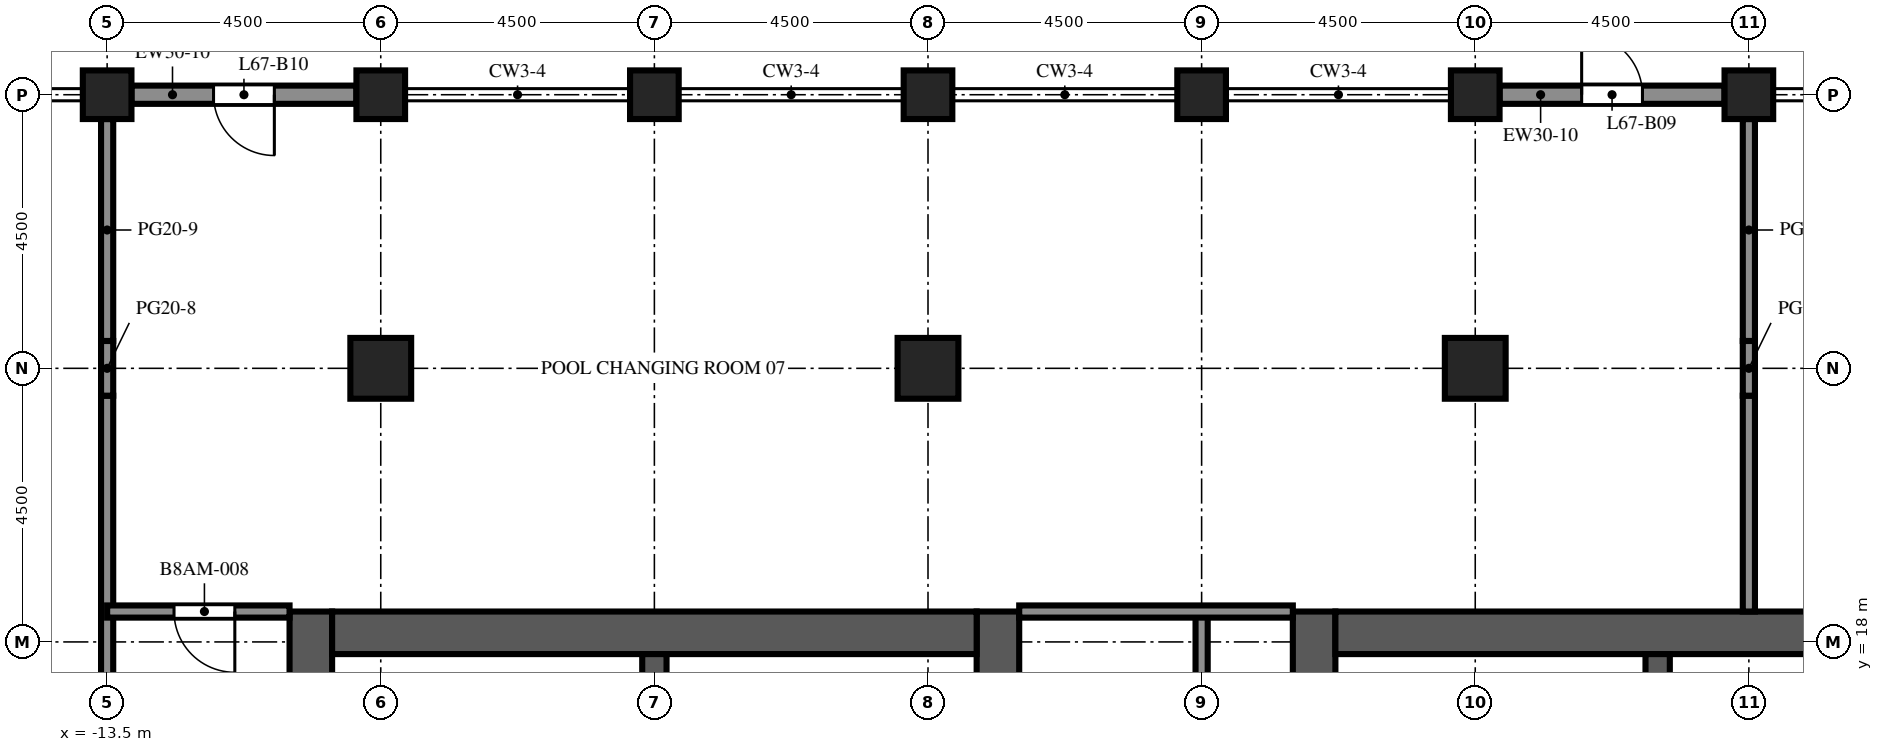
"""IFC4 building model, lengths in metres.
Left out: names, types, materials, properties, quantities, classifications, styles, units other than length and angle.
Written with IfcOpenShell. Run it as: python <this file> out.ifc"""

import sys

from ifc_helpers import new_model, si_unit, direction, frame, frame_2d, origin, origin_2d, place, context, subcontext, project, spatial, rectangle, extrude, element, fill, save


model = new_model("IFC4")
c1 = context("Model", 3, precision=1e-05, world=origin(), true_north=direction((0.0, 1.0)))
c2 = subcontext(c1, "Body", "Model", "MODEL_VIEW")
j1 = project(units=[si_unit("LENGTHUNIT", "METRE"), si_unit("PLANEANGLEUNIT", "RADIAN")], contexts=[c1])
p1 = place(None, origin())
s1 = spatial("IfcSite", under=j1, at=p1, CompositionType="ELEMENT")
p2 = place(p1, origin())
s2 = spatial("IfcBuilding", under=s1, at=p2, CompositionType="ELEMENT")
p3 = place(p2, frame((0.0, 0.0, 295.0)))
s3 = spatial("IfcBuildingStorey", under=s2, at=p3, CompositionType="ELEMENT", Elevation=295.0)
for number, where, z_axis, x_axis in (
    (1, (-13.5, 27.0, 0.0), (0.0, 0.0, 1.0), (1.0, 0.0, 0.0)),
    (2, (-9.0, 27.0, 0.0), (0.0, 0.0, 1.0), (1.0, 0.0, 0.0)),
    (3, (-4.5, 27.0, 0.0), (0.0, 0.0, 1.0), (1.0, 0.0, 0.0)),
    (4, (0.0, 27.0, 0.0), (0.0, 0.0, 1.0), (1.0, 0.0, 0.0)),
    (5, (4.5, 27.0, 0.0), (0.0, 0.0, 1.0), (1.0, 0.0, 0.0)),
    (6, (9.0, 27.0, 0.0), (0.0, 0.0, 1.0), (1.0, 0.0, 0.0)),
    (7, (13.5, 27.0, 0.0), (0.0, 0.0, 1.0), (1.0, 0.0, 0.0)),
):
    element("IfcColumn", number, at=place(p3, frame(where, z_axis=z_axis, x_axis=x_axis)), inside=s3, PredefinedType="COLUMN", context=c2, shape_type="SweptSolid", body=[
        extrude(rectangle(XDim=0.8, YDim=0.8, at=origin_2d()), origin(), (0.0, 0.0, 1.0), 6.0),
    ])
for number, where, z_axis, x_axis in (
    (8, (-9.0, 22.5, 0.0), (0.0, 0.0, 1.0), (1.0, 0.0, 0.0)),
    (9, (0.0, 22.5, 0.0), (0.0, 0.0, 1.0), (1.0, 0.0, 0.0)),
    (10, (9.0, 22.5, 0.0), (0.0, 0.0, 1.0), (1.0, 0.0, 0.0)),
):
    element("IfcColumn", number, at=place(p3, frame(where, z_axis=z_axis, x_axis=x_axis)), inside=s3, PredefinedType="COLUMN", context=c2, shape_type="SweptSolid", body=[
        extrude(rectangle(XDim=1.0, YDim=1.0, at=origin_2d()), origin(), (0.0, 0.0, 1.0), 5.4),
    ])
p4 = place(p3, frame((-10.15, -9.0, 0.0), z_axis=(0.0, 0.0, 1.0), x_axis=(0.0, 1.0, 0.0)))
e11 = element("IfcWall", 11, at=p4, inside=s3, PredefinedType="SHEAR", context=c2, shape_type="SweptSolid", body=[
    extrude(rectangle(XDim=27.5, YDim=0.7, at=frame_2d((13.75, 0.0))), origin(), (0.0, 0.0, 1.0), 6.0),
])
p5 = place(p4, frame((12.55, 0.0, 0.0)))
e12 = element("IfcOpeningElement", 12, at=p5, cuts=e11, PredefinedType="OPENING", context=c2, shape_type="SweptSolid", body=[
    extrude(rectangle(XDim=2.4, YDim=2.4, at=frame_2d((1.2, 1.2))), frame((0.0, 0.36, 0.0), z_axis=(0.0, -1.0, 0.0), x_axis=(1.0, 0.0, 0.0)), (0.0, 0.0, 1.0), 0.72),
])
p6 = place(p4, frame((6.825, 0.0, 0.0)))
e13 = element("IfcOpeningElement", 13, at=p6, cuts=e11, PredefinedType="OPENING", context=c2, shape_type="SweptSolid", body=[
    extrude(rectangle(XDim=1.2, YDim=2.1, at=frame_2d((0.6, 1.05))), frame((0.0, 0.36, 0.0), z_axis=(0.0, -1.0, 0.0), x_axis=(1.0, 0.0, 0.0)), (0.0, 0.0, 1.0), 0.72),
])
p7 = place(p4, frame((19.475, 0.0, 0.0)))
e14 = element("IfcOpeningElement", 14, at=p7, cuts=e11, PredefinedType="OPENING", context=c2, shape_type="SweptSolid", body=[
    extrude(rectangle(XDim=1.2, YDim=2.1, at=frame_2d((0.6, 1.05))), frame((0.0, 0.36, 0.0), z_axis=(0.0, -1.0, 0.0), x_axis=(1.0, 0.0, 0.0)), (0.0, 0.0, 1.0), 0.72),
])
p8 = place(p3, frame((1.15, -9.0, 0.0), z_axis=(0.0, 0.0, 1.0), x_axis=(0.0, 1.0, 0.0)))
e15 = element("IfcWall", 15, at=p8, inside=s3, PredefinedType="SHEAR", context=c2, shape_type="SweptSolid", body=[
    extrude(rectangle(XDim=27.5, YDim=0.7, at=frame_2d((13.75, 0.0))), origin(), (0.0, 0.0, 1.0), 6.0),
])
p9 = place(p8, frame((12.55, 0.0, 0.0)))
e16 = element("IfcOpeningElement", 16, at=p9, cuts=e15, PredefinedType="OPENING", context=c2, shape_type="SweptSolid", body=[
    extrude(rectangle(XDim=2.4, YDim=2.4, at=frame_2d((1.2, 1.2))), frame((0.0, 0.36, 0.0), z_axis=(0.0, -1.0, 0.0), x_axis=(1.0, 0.0, 0.0)), (0.0, 0.0, 1.0), 0.72),
])
p10 = place(p8, frame((5.46, 0.0, 0.0)))
e17 = element("IfcOpeningElement", 17, at=p10, cuts=e15, PredefinedType="OPENING", context=c2, shape_type="SweptSolid", body=[
    extrude(rectangle(XDim=0.968, YDim=2.1, at=frame_2d((0.484, 1.05))), frame((0.0, 0.36, 0.0), z_axis=(0.0, -1.0, 0.0), x_axis=(1.0, 0.0, 0.0)), (0.0, 0.0, 1.0), 0.72),
])
p11 = place(p8, frame((23.54, 0.0, 0.0)))
e18 = element("IfcOpeningElement", 18, at=p11, cuts=e15, PredefinedType="OPENING", context=c2, shape_type="SweptSolid", body=[
    extrude(rectangle(XDim=1.2, YDim=2.1, at=frame_2d((0.6, 1.05))), frame((0.0, 0.36, 0.0), z_axis=(0.0, -1.0, 0.0), x_axis=(1.0, 0.0, 0.0)), (0.0, 0.0, 1.0), 0.72),
])
p12 = place(p3, frame((-9.8, 18.15, 0.0), z_axis=(0.0, 0.0, 1.0), x_axis=(1.0, 0.0, 0.0)))
e19 = element("IfcWall", 19, at=p12, inside=s3, PredefinedType="SHEAR", context=c2, shape_type="SweptSolid", body=[
    extrude(rectangle(XDim=10.6, YDim=0.7, at=frame_2d((5.3, 0.0))), origin(), (0.0, 0.0, 1.0), 6.0),
])
p13 = place(p3, frame((-4.5, 10.2, 0.0), z_axis=(0.0, 0.0, 1.0), x_axis=(0.0, 1.0, 0.0)))
e20 = element("IfcWall", 20, at=p13, inside=s3, PredefinedType="SHEAR", context=c2, shape_type="SweptSolid", body=[
    extrude(rectangle(XDim=7.6, YDim=0.4, at=frame_2d((3.8, 0.0))), origin(), (0.0, 0.0, 1.0), 6.0),
])
p14 = place(p3, frame((6.35, -9.0, 0.0), z_axis=(0.0, 0.0, 1.0), x_axis=(0.0, 1.0, 0.0)))
e21 = element("IfcWall", 21, at=p14, inside=s3, PredefinedType="SHEAR", context=c2, shape_type="SweptSolid", body=[
    extrude(rectangle(XDim=27.5, YDim=0.7, at=frame_2d((13.75, 0.0))), origin(), (0.0, 0.0, 1.0), 6.0),
])
p15 = place(p14, frame((12.55, 0.0, 0.0)))
e22 = element("IfcOpeningElement", 22, at=p15, cuts=e21, PredefinedType="OPENING", context=c2, shape_type="SweptSolid", body=[
    extrude(rectangle(XDim=2.4, YDim=2.4, at=frame_2d((1.2, 1.2))), frame((0.0, 0.36, 0.0), z_axis=(0.0, -1.0, 0.0), x_axis=(1.0, 0.0, 0.0)), (0.0, 0.0, 1.0), 0.72),
])
p16 = place(p14, frame((5.46, 0.0, 0.0)))
e23 = element("IfcOpeningElement", 23, at=p16, cuts=e21, PredefinedType="OPENING", context=c2, shape_type="SweptSolid", body=[
    extrude(rectangle(XDim=0.968, YDim=2.1, at=frame_2d((0.484, 1.05))), frame((0.0, 0.36, 0.0), z_axis=(0.0, -1.0, 0.0), x_axis=(1.0, 0.0, 0.0)), (0.0, 0.0, 1.0), 0.72),
])
p17 = place(p14, frame((23.54, 0.0, 0.0)))
e24 = element("IfcOpeningElement", 24, at=p17, cuts=e21, PredefinedType="OPENING", context=c2, shape_type="SweptSolid", body=[
    extrude(rectangle(XDim=1.2, YDim=2.1, at=frame_2d((0.6, 1.05))), frame((0.0, 0.36, 0.0), z_axis=(0.0, -1.0, 0.0), x_axis=(1.0, 0.0, 0.0)), (0.0, 0.0, 1.0), 0.72),
])
p18 = place(p3, frame((6.7, 18.15, 0.0), z_axis=(0.0, 0.0, 1.0), x_axis=(1.0, 0.0, 0.0)))
e25 = element("IfcWall", 25, at=p18, inside=s3, PredefinedType="SHEAR", context=c2, shape_type="SweptSolid", body=[
    extrude(rectangle(XDim=10.6, YDim=0.7, at=frame_2d((5.3, 0.0))), origin(), (0.0, 0.0, 1.0), 6.0),
])
p19 = place(p3, frame((12.0, 10.2, 0.0), z_axis=(0.0, 0.0, 1.0), x_axis=(0.0, 1.0, 0.0)))
e26 = element("IfcWall", 26, at=p19, inside=s3, PredefinedType="SHEAR", context=c2, shape_type="SweptSolid", body=[
    extrude(rectangle(XDim=7.6, YDim=0.4, at=frame_2d((3.8, 0.0))), origin(), (0.0, 0.0, 1.0), 6.0),
])
p20 = place(p3, frame((9.4, 27.0, 0.0), z_axis=(0.0, 0.0, 1.0), x_axis=(1.0, 0.0, 0.0)))
e27 = element("IfcWall", 27, at=p20, inside=s3, PredefinedType="SOLIDWALL", context=c2, shape_type="SweptSolid", body=[
    extrude(rectangle(XDim=3.7, YDim=0.3, at=frame_2d((1.85, 0.0))), origin(), (0.0, 0.0, 1.0), 4.6),
])
p21 = place(p20, frame((1.35, 0.0, 0.0)))
e28 = element("IfcOpeningElement", 28, at=p21, cuts=e27, PredefinedType="OPENING", context=c2, shape_type="SweptSolid", body=[
    extrude(rectangle(XDim=1.0, YDim=2.2, at=frame_2d((0.5, 1.1))), frame((0.0, 0.16, 0.0), z_axis=(0.0, -1.0, 0.0), x_axis=(1.0, 0.0, 0.0)), (0.0, 0.0, 1.0), 0.32),
])
p22 = place(p3, frame((-13.1, 27.0, 0.0), z_axis=(0.0, 0.0, 1.0), x_axis=(1.0, 0.0, 0.0)))
e29 = element("IfcWall", 29, at=p22, inside=s3, PredefinedType="SOLIDWALL", context=c2, shape_type="SweptSolid", body=[
    extrude(rectangle(XDim=3.7, YDim=0.3, at=frame_2d((1.85, 0.0))), origin(), (0.0, 0.0, 1.0), 4.6),
])
p23 = place(p22, frame((1.35, 0.0, 0.0)))
e30 = element("IfcOpeningElement", 30, at=p23, cuts=e29, PredefinedType="OPENING", context=c2, shape_type="SweptSolid", body=[
    extrude(rectangle(XDim=1.0, YDim=2.2, at=frame_2d((0.5, 1.1))), frame((0.0, 0.16, 0.0), z_axis=(0.0, -1.0, 0.0), x_axis=(1.0, 0.0, 0.0)), (0.0, 0.0, 1.0), 0.32),
])
p24 = place(p3, frame((-0.5, 15.14, 0.0), z_axis=(0.0, 0.0, 1.0), x_axis=(0.0, 1.0, 0.0)))
e31 = element("IfcWall", 31, at=p24, inside=s3, PredefinedType="PARTITIONING", context=c2, shape_type="SweptSolid", body=[
    extrude(rectangle(XDim=2.66, YDim=0.1, at=frame_2d((1.33, 0.0))), origin(), (0.0, 0.0, 1.0), 5.4),
])
p25 = place(p24, frame((0.83, 0.0, 0.0)))
e32 = element("IfcOpeningElement", 32, at=p25, cuts=e31, PredefinedType="OPENING", context=c2, shape_type="SweptSolid", body=[
    extrude(rectangle(XDim=1.0, YDim=2.1, at=frame_2d((0.5, 1.05))), frame((0.0, 0.06, 0.0), z_axis=(0.0, -1.0, 0.0), x_axis=(1.0, 0.0, 0.0)), (0.0, 0.0, 1.0), 0.12),
])
p26 = place(p3, frame((8.0, 15.14, 0.0), z_axis=(0.0, 0.0, 1.0), x_axis=(0.0, 1.0, 0.0)))
e33 = element("IfcWall", 33, at=p26, inside=s3, PredefinedType="PARTITIONING", context=c2, shape_type="SweptSolid", body=[
    extrude(rectangle(XDim=2.66, YDim=0.1, at=frame_2d((1.33, 0.0))), origin(), (0.0, 0.0, 1.0), 5.4),
])
p27 = place(p26, frame((0.83, 0.0, 0.0)))
e34 = element("IfcOpeningElement", 34, at=p27, cuts=e33, PredefinedType="OPENING", context=c2, shape_type="SweptSolid", body=[
    extrude(rectangle(XDim=1.0, YDim=2.1, at=frame_2d((0.5, 1.05))), frame((0.0, 0.06, 0.0), z_axis=(0.0, -1.0, 0.0), x_axis=(1.0, 0.0, 0.0)), (0.0, 0.0, 1.0), 0.12),
])
p28 = place(p3, frame((-13.5, 6.25, 0.0), z_axis=(0.0, 0.0, 1.0), x_axis=(0.0, 1.0, 0.0)))
e35 = element("IfcWall", 35, at=p28, inside=s3, PredefinedType="PARTITIONING", context=c2, shape_type="SweptSolid", body=[
    extrude(rectangle(XDim=15.8, YDim=0.2, at=frame_2d((7.9, 0.0))), origin(), (0.0, 0.0, 1.0), 5.4),
])
p29 = place(p28, frame((7.1, 0.0, 0.0)))
e36 = element("IfcOpeningElement", 36, at=p29, cuts=e35, PredefinedType="OPENING", context=c2, shape_type="SweptSolid", body=[
    extrude(rectangle(XDim=1.0, YDim=2.1, at=frame_2d((0.5, 1.05))), frame((0.0, 0.11, 0.0), z_axis=(0.0, -1.0, 0.0), x_axis=(1.0, 0.0, 0.0)), (0.0, 0.0, 1.0), 0.22),
])
p30 = place(p3, frame((-13.5, 22.05, 0.0), z_axis=(0.0, 0.0, 1.0), x_axis=(0.0, 1.0, 0.0)))
e37 = element("IfcWall", 37, at=p30, inside=s3, PredefinedType="PARTITIONING", context=c2, shape_type="SweptSolid", body=[
    extrude(rectangle(XDim=0.9, YDim=0.2, at=frame_2d((0.45, 0.0))), origin(), (0.0, 0.0, 1.0), 3.57),
])
p31 = place(p3, frame((-13.5, 22.95, 0.0), z_axis=(0.0, 0.0, 1.0), x_axis=(0.0, 1.0, 0.0)))
e38 = element("IfcWall", 38, at=p31, inside=s3, PredefinedType="PARTITIONING", context=c2, shape_type="SweptSolid", body=[
    extrude(rectangle(XDim=3.65, YDim=0.2, at=frame_2d((1.825, 0.0))), origin(), (0.0, 0.0, 1.0), 4.77),
])
p32 = place(p3, frame((4.5, 18.5, 0.0), z_axis=(0.0, 0.0, 1.0), x_axis=(0.0, -1.0, 0.0)))
e39 = element("IfcWall", 39, at=p32, inside=s3, PredefinedType="PARTITIONING", context=c2, shape_type="SweptSolid", body=[
    extrude(rectangle(XDim=11.8, YDim=0.2, at=frame_2d((5.9, 0.0))), origin(), (0.0, 0.0, 1.0), 5.4),
])
p33 = place(p32, frame((4.7, 0.0, 0.0)))
e40 = element("IfcOpeningElement", 40, at=p33, cuts=e39, PredefinedType="OPENING", context=c2, shape_type="SweptSolid", body=[
    extrude(rectangle(XDim=1.0, YDim=2.1, at=frame_2d((0.5, 1.05))), frame((0.0, 0.11, 0.0), z_axis=(0.0, -1.0, 0.0), x_axis=(1.0, 0.0, 0.0)), (0.0, 0.0, 1.0), 0.22),
])
p34 = place(p3, frame((13.5, 18.5, 0.0), z_axis=(0.0, 0.0, 1.0), x_axis=(0.0, 1.0, 0.0)))
e41 = element("IfcWall", 41, at=p34, inside=s3, PredefinedType="PARTITIONING", context=c2, shape_type="SweptSolid", body=[
    extrude(rectangle(XDim=3.55, YDim=0.2, at=frame_2d((1.775, 0.0))), origin(), (0.0, 0.0, 1.0), 5.4),
])
p35 = place(p3, frame((13.5, 22.05, 0.0), z_axis=(0.0, 0.0, 1.0), x_axis=(0.0, 1.0, 0.0)))
e42 = element("IfcWall", 42, at=p35, inside=s3, PredefinedType="PARTITIONING", context=c2, shape_type="SweptSolid", body=[
    extrude(rectangle(XDim=0.9, YDim=0.2, at=frame_2d((0.45, 0.0))), origin(), (0.0, 0.0, 1.0), 3.57),
])
p36 = place(p3, frame((13.5, 22.95, 0.0), z_axis=(0.0, 0.0, 1.0), x_axis=(0.0, 1.0, 0.0)))
e43 = element("IfcWall", 43, at=p36, inside=s3, PredefinedType="PARTITIONING", context=c2, shape_type="SweptSolid", body=[
    extrude(rectangle(XDim=3.65, YDim=0.2, at=frame_2d((1.825, 0.0))), origin(), (0.0, 0.0, 1.0), 4.77),
])
p37 = place(p3, frame((-13.5, 18.5, 0.0), z_axis=(0.0, 0.0, 1.0), x_axis=(1.0, 0.0, 0.0)))
e44 = element("IfcWall", 44, at=p37, inside=s3, PredefinedType="PARTITIONING", context=c2, shape_type="SweptSolid", body=[
    extrude(rectangle(XDim=3.0, YDim=0.2, at=frame_2d((1.5, 0.0))), origin(), (0.0, 0.0, 1.0), 5.4),
])
p38 = place(p37, frame((1.1, 0.0, 0.0)))
e45 = element("IfcOpeningElement", 45, at=p38, cuts=e44, PredefinedType="OPENING", context=c2, shape_type="SweptSolid", body=[
    extrude(rectangle(XDim=1.0, YDim=2.1, at=frame_2d((0.5, 1.05))), frame((0.0, 0.11, 0.0), z_axis=(0.0, -1.0, 0.0), x_axis=(1.0, 0.0, 0.0)), (0.0, 0.0, 1.0), 0.22),
])
p39 = place(p3, frame((1.5, 18.5, 0.0), z_axis=(0.0, 0.0, 1.0), x_axis=(1.0, 0.0, 0.0)))
e46 = element("IfcWall", 46, at=p39, inside=s3, PredefinedType="PARTITIONING", context=c2, shape_type="SweptSolid", body=[
    extrude(rectangle(XDim=4.5, YDim=0.2, at=frame_2d((2.25, 0.0))), origin(), (0.0, 0.0, 1.0), 5.4),
])
p40 = place(p21, origin())
e47 = element("IfcDoor", 47, at=p40, inside=s3, OperationType="SINGLE_SWING_LEFT", PredefinedType="DOOR", context=c2, shape_type="SweptSolid", body=[
    extrude(rectangle(XDim=1.0, YDim=2.2, at=frame_2d((0.5, 1.1))), frame((0.0, 0.025, 0.0), z_axis=(0.0, -1.0, 0.0), x_axis=(1.0, 0.0, 0.0)), (0.0, 0.0, 1.0), 0.05),
])
fill(e28, e47)
p41 = place(p23, origin())
e48 = element("IfcDoor", 48, at=p41, inside=s3, OperationType="SINGLE_SWING_RIGHT", PredefinedType="DOOR", context=c2, shape_type="SweptSolid", body=[
    extrude(rectangle(XDim=1.0, YDim=2.2, at=frame_2d((0.5, 1.1))), frame((0.0, 0.025, 0.0), z_axis=(0.0, -1.0, 0.0), x_axis=(1.0, 0.0, 0.0)), (0.0, 0.0, 1.0), 0.05),
])
fill(e30, e48)
p42 = place(p38, origin())
e49 = element("IfcDoor", 49, at=p42, inside=s3, OperationType="SINGLE_SWING_RIGHT", PredefinedType="DOOR", context=c2, shape_type="SweptSolid", body=[
    extrude(rectangle(XDim=1.0, YDim=2.1, at=frame_2d((0.5, 1.05))), frame((0.0, 0.025, 0.0), z_axis=(0.0, -1.0, 0.0), x_axis=(1.0, 0.0, 0.0)), (0.0, 0.0, 1.0), 0.05),
])
fill(e45, e49)
save(model, sys.argv[1])
